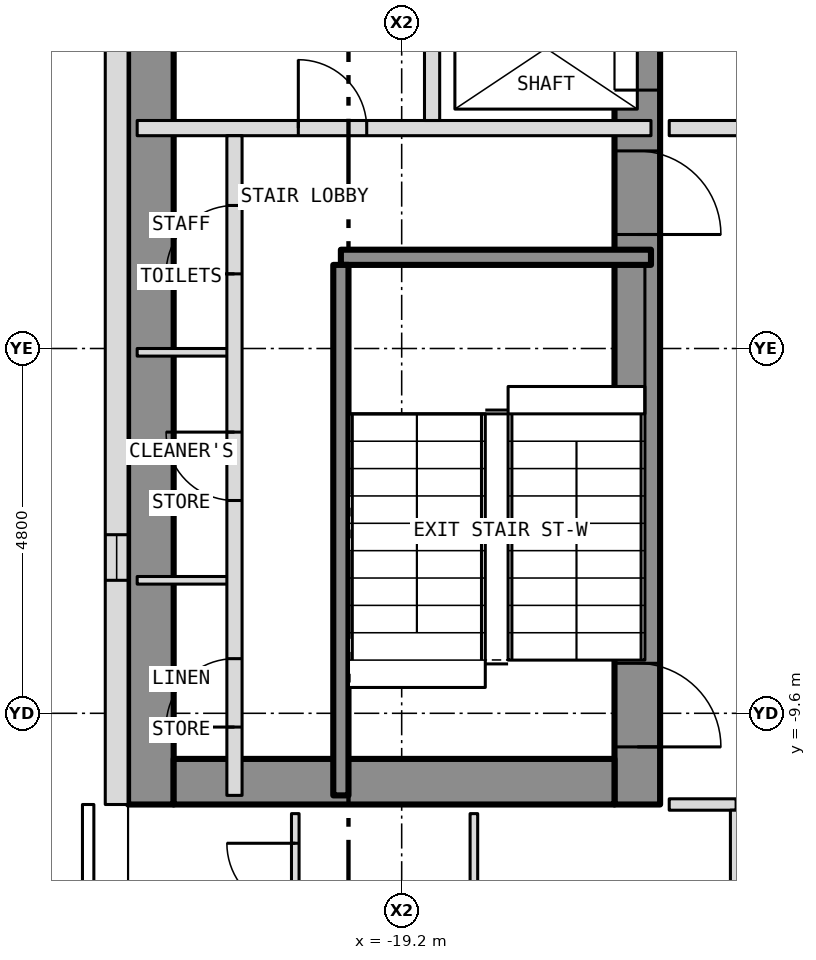
"""IFC4 building model, lengths in metres.
Left out: names, types, materials, properties, quantities, classifications, styles, units other than length and angle.
Written with IfcOpenShell. Run it as: python <this file> out.ifc"""

import sys

from ifc_helpers import new_model, si_unit, direction, frame, frame_2d, origin, place, context, subcontext, project, spatial, rectangle, extrude, element, fill, save


model = new_model("IFC4")
c1 = context("Model", 3, precision=1e-05, world=origin(), true_north=direction((0.0, 1.0)))
c2 = subcontext(c1, "Body", "Model", "MODEL_VIEW")
j1 = project(units=[si_unit("LENGTHUNIT", "METRE"), si_unit("PLANEANGLEUNIT", "RADIAN")], contexts=[c1])
p1 = place(None, origin())
s1 = spatial("IfcSite", under=j1, at=p1, CompositionType="ELEMENT")
p2 = place(p1, origin())
s2 = spatial("IfcBuilding", under=s1, at=p2, CompositionType="ELEMENT")
p3 = place(p2, frame((0.0, 0.0, 106.5)))
s3 = spatial("IfcBuildingStorey", under=s2, at=p3, CompositionType="ELEMENT", Elevation=106.5)
p4 = place(p3, frame((-16.1, -10.8, 0.0), z_axis=(0.0, 0.0, 1.0), x_axis=(0.0, 1.0, 0.0)))
e1 = element("IfcWall", 1, at=p4, inside=s3, PredefinedType="SHEAR", context=c2, shape_type="SweptSolid", body=[
    extrude(rectangle(XDim=21.6, YDim=0.6, at=frame_2d((10.8, 0.0))), origin(), (0.0, 0.0, 1.0), 3.25),
])
p5 = place(p4, frame((9.4, 0.0, 0.0)))
e2 = element("IfcOpeningElement", 2, at=p5, cuts=e1, PredefinedType="OPENING", context=c2, shape_type="SweptSolid", body=[
    extrude(rectangle(XDim=1.1, YDim=2.1, at=frame_2d((0.55, 1.05))), frame((0.0, 0.312, 0.0), z_axis=(0.0, -1.0, 0.0), x_axis=(1.0, 0.0, 0.0)), (0.0, 0.0, 1.0), 0.624),
])
p6 = place(p4, frame((11.5, 0.0, 0.0)))
e3 = element("IfcOpeningElement", 3, at=p6, cuts=e1, PredefinedType="OPENING", context=c2, shape_type="SweptSolid", body=[
    extrude(rectangle(XDim=1.1, YDim=2.1, at=frame_2d((0.55, 1.05))), frame((0.0, 0.312, 0.0), z_axis=(0.0, -1.0, 0.0), x_axis=(1.0, 0.0, 0.0)), (0.0, 0.0, 1.0), 0.624),
])
p7 = place(p4, frame((13.6, 0.0, 0.0)))
e4 = element("IfcOpeningElement", 4, at=p7, cuts=e1, PredefinedType="OPENING", context=c2, shape_type="SweptSolid", body=[
    extrude(rectangle(XDim=1.1, YDim=2.1, at=frame_2d((0.55, 1.05))), frame((0.0, 0.312, 0.0), z_axis=(0.0, -1.0, 0.0), x_axis=(1.0, 0.0, 0.0)), (0.0, 0.0, 1.0), 0.624),
])
p8 = place(p4, frame((15.7, 0.0, 0.0)))
e5 = element("IfcOpeningElement", 5, at=p8, cuts=e1, PredefinedType="OPENING", context=c2, shape_type="SweptSolid", body=[
    extrude(rectangle(XDim=1.1, YDim=2.1, at=frame_2d((0.55, 1.05))), frame((0.0, 0.312, 0.0), z_axis=(0.0, -1.0, 0.0), x_axis=(1.0, 0.0, 0.0)), (0.0, 0.0, 1.0), 0.624),
])
p9 = place(p4, frame((17.8, 0.0, 0.0)))
e6 = element("IfcOpeningElement", 6, at=p9, cuts=e1, PredefinedType="OPENING", context=c2, shape_type="SweptSolid", body=[
    extrude(rectangle(XDim=1.1, YDim=2.1, at=frame_2d((0.55, 1.05))), frame((0.0, 0.312, 0.0), z_axis=(0.0, -1.0, 0.0), x_axis=(1.0, 0.0, 0.0)), (0.0, 0.0, 1.0), 0.624),
])
p10 = place(p4, frame((0.758, 0.0, 0.0)))
e7 = element("IfcOpeningElement", 7, at=p10, cuts=e1, PredefinedType="OPENING", context=c2, shape_type="SweptSolid", body=[
    extrude(rectangle(XDim=1.1, YDim=2.1, at=frame_2d((0.55, 1.05))), frame((0.0, 0.312, 0.0), z_axis=(0.0, -1.0, 0.0), x_axis=(1.0, 0.0, 0.0)), (0.0, 0.0, 1.0), 0.624),
])
p11 = place(p4, frame((7.5, 0.0, 0.0)))
e8 = element("IfcOpeningElement", 8, at=p11, cuts=e1, PredefinedType="OPENING", context=c2, shape_type="SweptSolid", body=[
    extrude(rectangle(XDim=1.1, YDim=2.1, at=frame_2d((0.55, 1.05))), frame((0.0, 0.312, 0.0), z_axis=(0.0, -1.0, 0.0), x_axis=(1.0, 0.0, 0.0)), (0.0, 0.0, 1.0), 0.624),
])
p12 = place(p3, frame((-22.5, -10.8, 0.0), z_axis=(0.0, 0.0, 1.0), x_axis=(0.0, 1.0, 0.0)))
e9 = element("IfcWall", 9, at=p12, inside=s3, PredefinedType="SHEAR", context=c2, shape_type="SweptSolid", body=[
    extrude(rectangle(XDim=21.6, YDim=0.6, at=frame_2d((10.8, 0.0))), origin(), (0.0, 0.0, 1.0), 3.25),
])
p13 = place(p3, frame((-22.2, -10.5, 0.0), z_axis=(0.0, 0.0, 1.0), x_axis=(1.0, 0.0, 0.0)))
e10 = element("IfcWall", 10, at=p13, inside=s3, PredefinedType="SHEAR", context=c2, shape_type="SweptSolid", body=[
    extrude(rectangle(XDim=5.8, YDim=0.6, at=frame_2d((2.9, 0.0))), origin(), (0.0, 0.0, 1.0), 3.25),
])
p14 = place(p3, frame((-22.95, 10.8, 0.0), z_axis=(0.0, 0.0, 1.0), x_axis=(0.0, -1.0, 0.0)))
e11 = element("IfcWall", 11, at=p14, inside=s3, PredefinedType="SOLIDWALL", context=c2, shape_type="SweptSolid", body=[
    extrude(rectangle(XDim=21.6, YDim=0.3, at=frame_2d((10.8, 0.0))), origin(), (0.0, 0.0, 1.0), 3.5),
])
p15 = place(p14, frame((18.05, 0.0, 1.0)))
e12 = element("IfcOpeningElement", 12, at=p15, cuts=e11, PredefinedType="OPENING", context=c2, shape_type="SweptSolid", body=[
    extrude(rectangle(XDim=0.6, YDim=1.5, at=frame_2d((0.3, 0.75))), frame((0.0, 0.162, 0.0), z_axis=(0.0, -1.0, 0.0), x_axis=(1.0, 0.0, 0.0)), (0.0, 0.0, 1.0), 0.324),
])
p16 = place(p3, frame((-15.68, -10.8, 0.0), z_axis=(0.0, 0.0, 1.0), x_axis=(1.0, 0.0, 0.0)))
e13 = element("IfcWall", 13, at=p16, inside=s3, PredefinedType="PARTITIONING", context=c2, shape_type="SweptSolid", body=[
    extrude(rectangle(XDim=0.88, YDim=0.15, at=frame_2d((0.44, 0.0))), origin(), (0.0, 0.0, 1.0), 3.35),
])
for number, where, z_axis, x_axis in (
    (14, (-22.68, -7.85, 0.0), (0.0, 0.0, 1.0), (1.0, 0.0, 0.0)),
    (15, (-22.68, -4.85, 0.0), (0.0, 0.0, 1.0), (1.0, 0.0, 0.0)),
):
    element("IfcWall", number, at=place(p3, frame(where, z_axis=z_axis, x_axis=x_axis)), inside=s3, PredefinedType="PARTITIONING", context=c2, shape_type="SweptSolid", body=[
        extrude(rectangle(XDim=1.28, YDim=0.1, at=frame_2d((0.64, 0.0))), origin(), (0.0, 0.0, 1.0), 3.25),
    ])
p17 = place(p3, frame((-20.0, -3.6, 0.0), z_axis=(0.0, 0.0, 1.0), x_axis=(1.0, 0.0, 0.0)))
e16 = element("IfcWall", 16, at=p17, inside=s3, PredefinedType="SHEAR", context=c2, shape_type="SweptSolid", body=[
    extrude(rectangle(XDim=4.08, YDim=0.2, at=frame_2d((2.04, 0.0))), origin(), (0.0, 0.0, 1.0), 3.25),
])
p18 = place(p3, frame((-22.68, -1.9, 0.0), z_axis=(0.0, 0.0, 1.0), x_axis=(1.0, 0.0, 0.0)))
e17 = element("IfcWall", 17, at=p18, inside=s3, PredefinedType="PARTITIONING", context=c2, shape_type="SweptSolid", body=[
    extrude(rectangle(XDim=6.76, YDim=0.2, at=frame_2d((3.38, 0.0))), origin(), (0.0, 0.0, 1.0), 3.25),
])
p19 = place(p18, frame((2.12, 0.0, 0.0)))
e18 = element("IfcOpeningElement", 18, at=p19, cuts=e17, PredefinedType="OPENING", context=c2, shape_type="SweptSolid", body=[
    extrude(rectangle(XDim=0.9, YDim=2.1, at=frame_2d((0.45, 1.05))), frame((0.0, 0.112, 0.0), z_axis=(0.0, -1.0, 0.0), x_axis=(1.0, 0.0, 0.0)), (0.0, 0.0, 1.0), 0.224),
])
p20 = place(p3, frame((-15.68, -1.9, 0.0), z_axis=(0.0, 0.0, 1.0), x_axis=(1.0, 0.0, 0.0)))
e19 = element("IfcWall", 19, at=p20, inside=s3, PredefinedType="PARTITIONING", context=c2, shape_type="SweptSolid", body=[
    extrude(rectangle(XDim=3.28, YDim=0.2, at=frame_2d((1.64, 0.0))), origin(), (0.0, 0.0, 1.0), 3.35),
])
p21 = place(p20, frame((0.94, 0.0, 0.0)))
e20 = element("IfcOpeningElement", 20, at=p21, cuts=e19, PredefinedType="OPENING", context=c2, shape_type="SweptSolid", body=[
    extrude(rectangle(XDim=1.1, YDim=2.1, at=frame_2d((0.55, 1.05))), frame((0.0, 0.112, 0.0), z_axis=(0.0, -1.0, 0.0), x_axis=(1.0, 0.0, 0.0)), (0.0, 0.0, 1.0), 0.224),
])
p22 = place(p3, frame((-21.4, -10.68, 0.0), z_axis=(0.0, 0.0, 1.0), x_axis=(0.0, 1.0, 0.0)))
e21 = element("IfcWall", 21, at=p22, inside=s3, PredefinedType="PARTITIONING", context=c2, shape_type="SweptSolid", body=[
    extrude(rectangle(XDim=8.68, YDim=0.2, at=frame_2d((4.34, 0.0))), origin(), (0.0, 0.0, 1.0), 3.25),
])
p23 = place(p22, frame((0.899, 0.0, 0.0)))
e22 = element("IfcOpeningElement", 22, at=p23, cuts=e21, PredefinedType="OPENING", context=c2, shape_type="SweptSolid", body=[
    extrude(rectangle(XDim=0.9, YDim=2.1, at=frame_2d((0.45, 1.05))), frame((0.0, 0.112, 0.0), z_axis=(0.0, -1.0, 0.0), x_axis=(1.0, 0.0, 0.0)), (0.0, 0.0, 1.0), 0.224),
])
p24 = place(p22, frame((3.88, 0.0, 0.0)))
e23 = element("IfcOpeningElement", 23, at=p24, cuts=e21, PredefinedType="OPENING", context=c2, shape_type="SweptSolid", body=[
    extrude(rectangle(XDim=0.9, YDim=2.1, at=frame_2d((0.45, 1.05))), frame((0.0, 0.112, 0.0), z_axis=(0.0, -1.0, 0.0), x_axis=(1.0, 0.0, 0.0)), (0.0, 0.0, 1.0), 0.224),
])
p25 = place(p22, frame((6.862, 0.0, 0.0)))
e24 = element("IfcOpeningElement", 24, at=p25, cuts=e21, PredefinedType="OPENING", context=c2, shape_type="SweptSolid", body=[
    extrude(rectangle(XDim=0.9, YDim=2.1, at=frame_2d((0.45, 1.05))), frame((0.0, 0.112, 0.0), z_axis=(0.0, -1.0, 0.0), x_axis=(1.0, 0.0, 0.0)), (0.0, 0.0, 1.0), 0.224),
])
p26 = place(p3, frame((-20.6, -13.95, 0.0), z_axis=(0.0, 0.0, 1.0), x_axis=(0.0, 1.0, 0.0)))
e25 = element("IfcWall", 25, at=p26, inside=s3, PredefinedType="PARTITIONING", context=c2, shape_type="SweptSolid", body=[
    extrude(rectangle(XDim=3.03, YDim=0.1, at=frame_2d((1.515, 0.0))), origin(), (0.0, 0.0, 1.0), 3.35),
])
p27 = place(p26, frame((1.74, 0.0, 0.0)))
e26 = element("IfcOpeningElement", 26, at=p27, cuts=e25, PredefinedType="OPENING", context=c2, shape_type="SweptSolid", body=[
    extrude(rectangle(XDim=0.9, YDim=2.1, at=frame_2d((0.45, 1.05))), frame((0.0, 0.062, 0.0), z_axis=(0.0, -1.0, 0.0), x_axis=(1.0, 0.0, 0.0)), (0.0, 0.0, 1.0), 0.124),
])
p28 = place(p3, frame((-20.0, -10.68, 0.0), z_axis=(0.0, 0.0, 1.0), x_axis=(0.0, 1.0, 0.0)))
e27 = element("IfcWall", 27, at=p28, inside=s3, PredefinedType="SHEAR", context=c2, shape_type="SweptSolid", body=[
    extrude(rectangle(XDim=6.98, YDim=0.2, at=frame_2d((3.49, 0.0))), origin(), (0.0, 0.0, 1.0), 3.25),
])
p29 = place(p3, frame((-18.8, -1.8, 0.0), z_axis=(0.0, 0.0, 1.0), x_axis=(0.0, 1.0, 0.0)))
e28 = element("IfcWall", 28, at=p29, inside=s3, PredefinedType="PARTITIONING", context=c2, shape_type="SweptSolid", body=[
    extrude(rectangle(XDim=12.48, YDim=0.2, at=frame_2d((6.24, 0.0))), origin(), (0.0, 0.0, 1.0), 3.25),
])
p30 = place(p3, frame((-18.25, -18.191, 0.0), z_axis=(0.0, 0.0, 1.0), x_axis=(0.0, 1.0, 0.0)))
e29 = element("IfcWall", 29, at=p30, inside=s3, PredefinedType="PARTITIONING", context=c2, shape_type="SweptSolid", body=[
    extrude(rectangle(XDim=7.271, YDim=0.1, at=frame_2d((3.635, 0.0))), origin(), (0.0, 0.0, 1.0), 3.35),
])
p31 = place(p30, frame((0.941, 0.0, 0.0)))
e30 = element("IfcOpeningElement", 30, at=p31, cuts=e29, PredefinedType="OPENING", context=c2, shape_type="SweptSolid", body=[
    extrude(rectangle(XDim=0.9, YDim=2.1, at=frame_2d((0.45, 1.05))), frame((0.0, 0.062, 0.0), z_axis=(0.0, -1.0, 0.0), x_axis=(1.0, 0.0, 0.0)), (0.0, 0.0, 1.0), 0.124),
])
p32 = place(p3, frame((-14.8, -14.725, 0.0), z_axis=(0.0, 0.0, 1.0), x_axis=(0.0, 1.0, 0.0)))
e31 = element("IfcWall", 31, at=p32, inside=s3, PredefinedType="PARTITIONING", context=c2, shape_type="SweptSolid", body=[
    extrude(rectangle(XDim=3.85, YDim=0.15, at=frame_2d((1.925, 0.0))), origin(), (0.0, 0.0, 1.0), 3.35),
])
p33 = place(p32, frame((0.525, 0.0, 0.0)))
e32 = element("IfcOpeningElement", 32, at=p33, cuts=e31, PredefinedType="OPENING", context=c2, shape_type="SweptSolid", body=[
    extrude(rectangle(XDim=1.0, YDim=2.1, at=frame_2d((0.5, 1.05))), frame((0.0, 0.087, 0.0), z_axis=(0.0, -1.0, 0.0), x_axis=(1.0, 0.0, 0.0)), (0.0, 0.0, 1.0), 0.174),
])
p34 = place(p15, origin())
e33 = element("IfcWindow", 33, at=p34, inside=s3, PartitioningType="SINGLE_PANEL", PredefinedType="WINDOW", context=c2, shape_type="SweptSolid", body=[
    extrude(rectangle(XDim=0.6, YDim=1.5, at=frame_2d((0.3, 0.75))), frame((0.0, -0.06, 0.0), z_axis=(0.0, -1.0, 0.0), x_axis=(1.0, 0.0, 0.0)), (0.0, 0.0, 1.0), 0.06),
])
fill(e12, e33)
p35 = place(p5, origin())
e34 = element("IfcDoor", 34, at=p35, inside=s3, OperationType="SLIDING_TO_LEFT", PredefinedType="DOOR", context=c2, shape_type="SweptSolid", body=[
    extrude(rectangle(XDim=1.1, YDim=2.1, at=frame_2d((0.55, 1.05))), frame((0.0, 0.025, 0.0), z_axis=(0.0, -1.0, 0.0), x_axis=(1.0, 0.0, 0.0)), (0.0, 0.0, 1.0), 0.05),
])
fill(e2, e34)
p36 = place(p10, origin())
e35 = element("IfcDoor", 35, at=p36, inside=s3, OperationType="SINGLE_SWING_LEFT", PredefinedType="DOOR", context=c2, shape_type="SweptSolid", body=[
    extrude(rectangle(XDim=1.1, YDim=2.1, at=frame_2d((0.55, 1.05))), frame((0.0, 0.025, 0.0), z_axis=(0.0, -1.0, 0.0), x_axis=(1.0, 0.0, 0.0)), (0.0, 0.0, 1.0), 0.05),
])
fill(e7, e35)
p37 = place(p11, origin())
e36 = element("IfcDoor", 36, at=p37, inside=s3, OperationType="SINGLE_SWING_LEFT", PredefinedType="DOOR", context=c2, shape_type="SweptSolid", body=[
    extrude(rectangle(XDim=1.1, YDim=2.1, at=frame_2d((0.55, 1.05))), frame((0.0, 0.025, 0.0), z_axis=(0.0, -1.0, 0.0), x_axis=(1.0, 0.0, 0.0)), (0.0, 0.0, 1.0), 0.05),
])
fill(e8, e36)
p38 = place(p23, origin())
e37 = element("IfcDoor", 37, at=p38, inside=s3, OperationType="SINGLE_SWING_LEFT", PredefinedType="DOOR", context=c2, shape_type="SweptSolid", body=[
    extrude(rectangle(XDim=0.9, YDim=2.1, at=frame_2d((0.45, 1.05))), frame((0.0, 0.025, 0.0), z_axis=(0.0, -1.0, 0.0), x_axis=(1.0, 0.0, 0.0)), (0.0, 0.0, 1.0), 0.05),
])
fill(e22, e37)
p39 = place(p24, origin())
e38 = element("IfcDoor", 38, at=p39, inside=s3, OperationType="SINGLE_SWING_RIGHT", PredefinedType="DOOR", context=c2, shape_type="SweptSolid", body=[
    extrude(rectangle(XDim=0.9, YDim=2.1, at=frame_2d((0.45, 1.05))), frame((0.0, 0.025, 0.0), z_axis=(0.0, -1.0, 0.0), x_axis=(1.0, 0.0, 0.0)), (0.0, 0.0, 1.0), 0.05),
])
fill(e23, e38)
p40 = place(p25, origin())
e39 = element("IfcDoor", 39, at=p40, inside=s3, OperationType="SINGLE_SWING_LEFT", PredefinedType="DOOR", context=c2, shape_type="SweptSolid", body=[
    extrude(rectangle(XDim=0.9, YDim=2.1, at=frame_2d((0.45, 1.05))), frame((0.0, 0.025, 0.0), z_axis=(0.0, -1.0, 0.0), x_axis=(1.0, 0.0, 0.0)), (0.0, 0.0, 1.0), 0.05),
])
fill(e24, e39)
p41 = place(p19, origin())
e40 = element("IfcDoor", 40, at=p41, inside=s3, OperationType="SINGLE_SWING_LEFT", PredefinedType="DOOR", context=c2, shape_type="SweptSolid", body=[
    extrude(rectangle(XDim=0.9, YDim=2.1, at=frame_2d((0.45, 1.05))), frame((0.0, 0.025, 0.0), z_axis=(0.0, -1.0, 0.0), x_axis=(1.0, 0.0, 0.0)), (0.0, 0.0, 1.0), 0.05),
])
fill(e18, e40)
p42 = place(p27, origin())
e41 = element("IfcDoor", 41, at=p42, inside=s3, OperationType="SINGLE_SWING_RIGHT", PredefinedType="DOOR", context=c2, shape_type="SweptSolid", body=[
    extrude(rectangle(XDim=0.9, YDim=2.1, at=frame_2d((0.45, 1.05))), frame((0.0, 0.025, 0.0), z_axis=(0.0, -1.0, 0.0), x_axis=(1.0, 0.0, 0.0)), (0.0, 0.0, 1.0), 0.05),
])
fill(e26, e41)
save(model, sys.argv[1])
